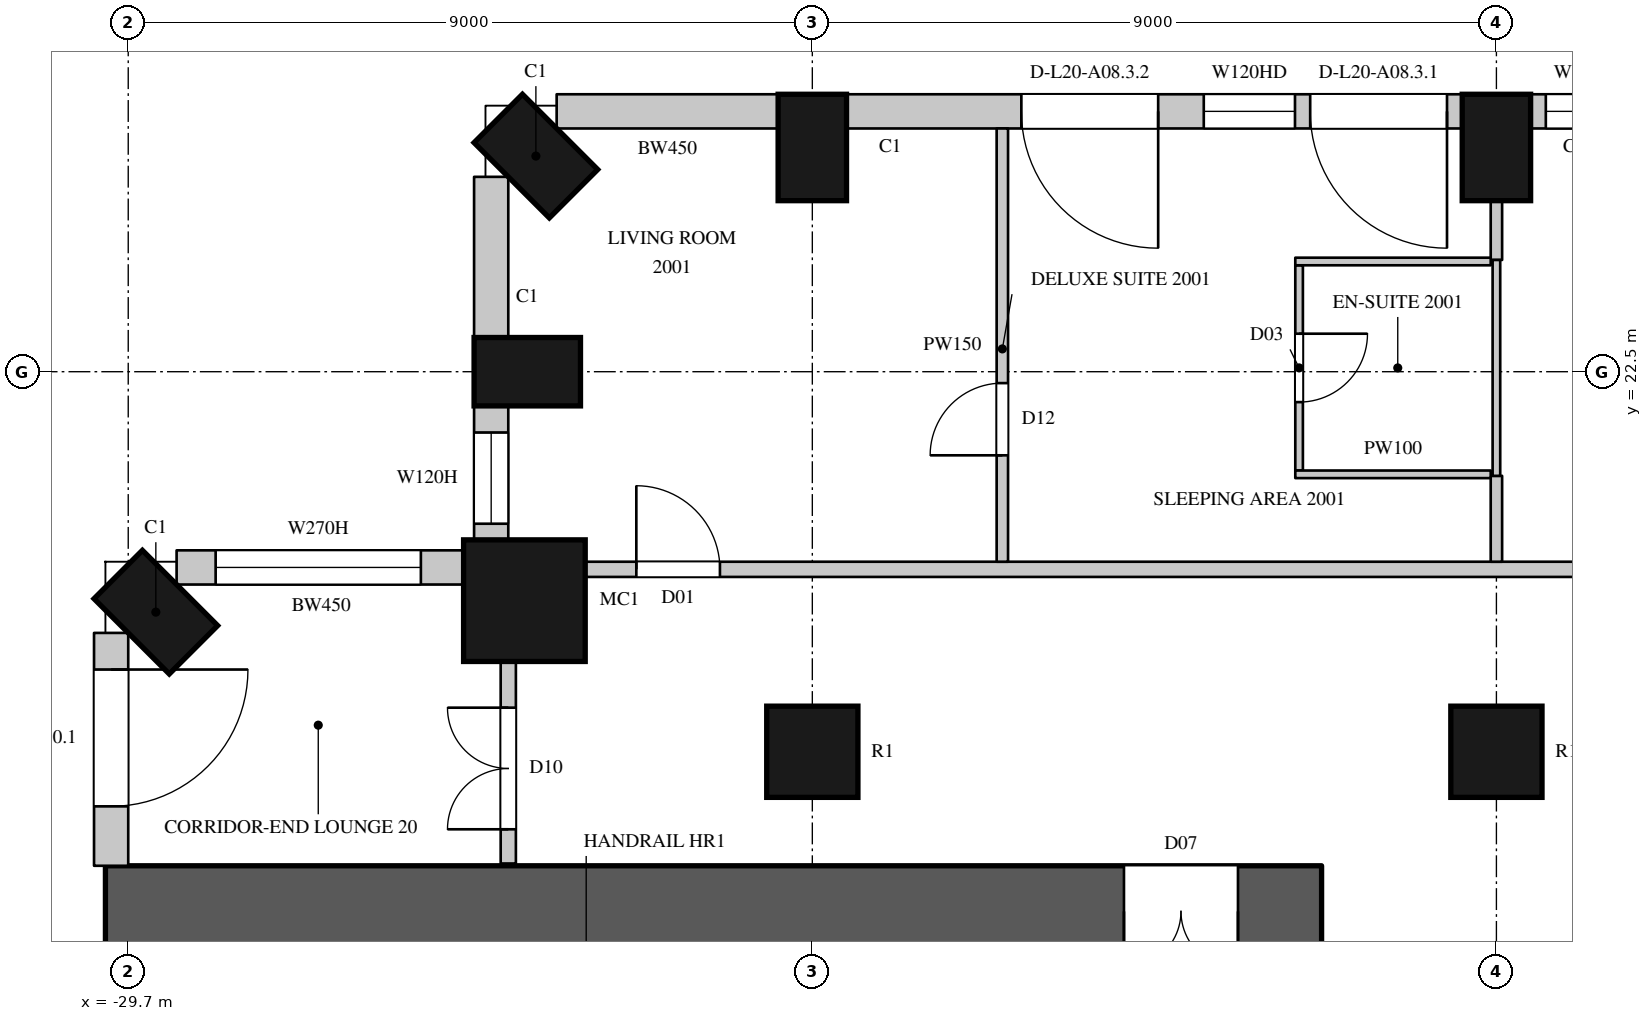
"""IFC4 building model, lengths in metres.
Left out: names, types, materials, properties, quantities, classifications, styles, units other than length and angle.
Written with IfcOpenShell. Run it as: python <this file> out.ifc"""

import sys

from ifc_helpers import new_model, si_unit, direction, frame, frame_2d, origin, origin_2d, place, context, subcontext, project, spatial, rectangle, circle, extrude, element, fill, save


model = new_model("IFC4")
c1 = context("Model", 3, precision=1e-05, world=origin(), true_north=direction((0.0, 1.0)))
c2 = subcontext(c1, "Body", "Model", "MODEL_VIEW")
j1 = project(units=[si_unit("LENGTHUNIT", "METRE"), si_unit("PLANEANGLEUNIT", "RADIAN")], contexts=[c1])
p1 = place(None, origin())
s1 = spatial("IfcSite", under=j1, at=p1, CompositionType="ELEMENT")
p2 = place(p1, origin())
s2 = spatial("IfcBuilding", under=s1, at=p2, CompositionType="ELEMENT")
p3 = place(p2, frame((0.0, 0.0, 102.3)))
s3 = spatial("IfcBuildingStorey", under=s2, at=p3, CompositionType="ELEMENT", Elevation=102.3)
for number, where, z_axis, x_axis in (
    (1, (-29.337, 19.337, 0.0), (0.0, 0.0, 1.0), (-0.707, -0.707, 0.0)),
    (2, (-11.7, 25.45, 0.0), (0.0, 0.0, 1.0), (-1.0, 0.0, 0.0)),
    (3, (-20.7, 25.45, 0.0), (0.0, 0.0, 1.0), (-1.0, 0.0, 0.0)),
    (4, (-24.337, 25.337, 0.0), (0.0, 0.0, 1.0), (-0.707, -0.707, 0.0)),
    (5, (-24.45, 22.5, 0.0), (0.0, 0.0, 1.0), (0.0, -1.0, 0.0)),
):
    element("IfcColumn", number, at=place(p3, frame(where, z_axis=z_axis, x_axis=x_axis)), inside=s3, PredefinedType="COLUMN", context=c2, shape_type="SweptSolid", body=[
        extrude(rectangle(XDim=0.9, YDim=1.4, at=origin_2d()), origin(), (0.0, 0.0, 1.0), 3.6),
    ])
p4 = place(p3, frame((-24.488, 19.488, 0.0), z_axis=(0.0, 0.0, 1.0), x_axis=(1.0, 0.0, 0.0)))
e6 = element("IfcColumn", 6, at=p4, inside=s3, PredefinedType="COLUMN", context=c2, shape_type="SweptSolid", body=[
    extrude(circle(Radius=0.8, at=origin_2d()), origin(), (0.0, 0.0, 1.0), 3.6),
])
for number, where, z_axis, x_axis in (
    (7, (-20.7, 17.5, 0.0), (0.0, 0.0, 1.0), (1.0, 0.0, 0.0)),
    (8, (-11.7, 17.5, 0.0), (0.0, 0.0, 1.0), (1.0, 0.0, 0.0)),
):
    element("IfcColumn", number, at=place(p3, frame(where, z_axis=z_axis, x_axis=x_axis)), inside=s3, PredefinedType="COLUMN", context=c2, shape_type="SweptSolid", body=[
        extrude(circle(Radius=0.6, at=origin_2d()), origin(), (0.0, 0.0, 1.0), 3.6),
    ])
p5 = place(p3, frame((-29.925, 19.064, 0.0), z_axis=(0.0, 0.0, 1.0), x_axis=(0.0, -1.0, 0.0)))
e9 = element("IfcWall", 9, at=p5, inside=s3, PredefinedType="SOLIDWALL", context=c2, shape_type="SweptSolid", body=[
    extrude(rectangle(XDim=3.064, YDim=0.45, at=frame_2d((1.532, 0.0))), origin(), (0.0, 0.0, 1.0), 3.3),
])
p6 = place(p5, frame((0.482, 0.0, 0.0)))
e10 = element("IfcOpeningElement", 10, at=p6, cuts=e9, PredefinedType="OPENING", context=c2, shape_type="SweptSolid", body=[
    extrude(rectangle(XDim=1.8, YDim=2.4, at=frame_2d((0.9, 1.2))), frame((0.0, 0.235, 0.0), z_axis=(0.0, -1.0, 0.0), x_axis=(1.0, 0.0, 0.0)), (0.0, 0.0, 1.0), 0.47),
])
p7 = place(p3, frame((-3.15, 25.925, 0.0), z_axis=(0.0, 0.0, 1.0), x_axis=(-1.0, 0.0, 0.0)))
e11 = element("IfcWall", 11, at=p7, inside=s3, PredefinedType="SOLIDWALL", context=c2, shape_type="SweptSolid", body=[
    extrude(rectangle(XDim=8.1, YDim=0.45, at=frame_2d((4.05, 0.0))), origin(), (0.0, 0.0, 1.0), 3.3),
])
p8 = place(p7, frame((0.2, 0.0, 0.0)))
e12 = element("IfcOpeningElement", 12, at=p8, cuts=e11, PredefinedType="OPENING", context=c2, shape_type="SweptSolid", body=[
    extrude(rectangle(XDim=1.8, YDim=2.4, at=frame_2d((0.9, 1.2))), frame((0.0, 0.235, 0.0), z_axis=(0.0, -1.0, 0.0), x_axis=(1.0, 0.0, 0.0)), (0.0, 0.0, 1.0), 0.47),
])
p9 = place(p7, frame((2.2, 0.0, 1.05)))
e13 = element("IfcOpeningElement", 13, at=p9, cuts=e11, PredefinedType="OPENING", context=c2, shape_type="SweptSolid", body=[
    extrude(rectangle(XDim=1.2, YDim=2.0, at=frame_2d((0.6, 1.0))), frame((0.0, 0.235, 0.0), z_axis=(0.0, -1.0, 0.0), x_axis=(1.0, 0.0, 0.0)), (0.0, 0.0, 1.0), 0.47),
])
p10 = place(p7, frame((4.7, 0.0, 0.0)))
e14 = element("IfcOpeningElement", 14, at=p10, cuts=e11, PredefinedType="OPENING", context=c2, shape_type="SweptSolid", body=[
    extrude(rectangle(XDim=1.8, YDim=2.4, at=frame_2d((0.9, 1.2))), frame((0.0, 0.235, 0.0), z_axis=(0.0, -1.0, 0.0), x_axis=(1.0, 0.0, 0.0)), (0.0, 0.0, 1.0), 0.47),
])
p11 = place(p7, frame((6.7, 0.0, 1.05)))
e15 = element("IfcOpeningElement", 15, at=p11, cuts=e11, PredefinedType="OPENING", context=c2, shape_type="SweptSolid", body=[
    extrude(rectangle(XDim=1.2, YDim=2.0, at=frame_2d((0.6, 1.0))), frame((0.0, 0.235, 0.0), z_axis=(0.0, -1.0, 0.0), x_axis=(1.0, 0.0, 0.0)), (0.0, 0.0, 1.0), 0.47),
])
p12 = place(p3, frame((-12.15, 25.925, 0.0), z_axis=(0.0, 0.0, 1.0), x_axis=(-1.0, 0.0, 0.0)))
e16 = element("IfcWall", 16, at=p12, inside=s3, PredefinedType="SOLIDWALL", context=c2, shape_type="SweptSolid", body=[
    extrude(rectangle(XDim=8.1, YDim=0.45, at=frame_2d((4.05, 0.0))), origin(), (0.0, 0.0, 1.0), 3.3),
])
p13 = place(p12, frame((0.2, 0.0, 0.0)))
e17 = element("IfcOpeningElement", 17, at=p13, cuts=e16, PredefinedType="OPENING", context=c2, shape_type="SweptSolid", body=[
    extrude(rectangle(XDim=1.8, YDim=2.4, at=frame_2d((0.9, 1.2))), frame((0.0, 0.235, 0.0), z_axis=(0.0, -1.0, 0.0), x_axis=(1.0, 0.0, 0.0)), (0.0, 0.0, 1.0), 0.47),
])
p14 = place(p12, frame((2.2, 0.0, 1.05)))
e18 = element("IfcOpeningElement", 18, at=p14, cuts=e16, PredefinedType="OPENING", context=c2, shape_type="SweptSolid", body=[
    extrude(rectangle(XDim=1.2, YDim=2.0, at=frame_2d((0.6, 1.0))), frame((0.0, 0.235, 0.0), z_axis=(0.0, -1.0, 0.0), x_axis=(1.0, 0.0, 0.0)), (0.0, 0.0, 1.0), 0.47),
])
p15 = place(p12, frame((4.0, 0.0, 0.0)))
e19 = element("IfcOpeningElement", 19, at=p15, cuts=e16, PredefinedType="OPENING", context=c2, shape_type="SweptSolid", body=[
    extrude(rectangle(XDim=1.8, YDim=2.4, at=frame_2d((0.9, 1.2))), frame((0.0, 0.235, 0.0), z_axis=(0.0, -1.0, 0.0), x_axis=(1.0, 0.0, 0.0)), (0.0, 0.0, 1.0), 0.47),
])
p16 = place(p3, frame((-21.15, 25.925, 0.0), z_axis=(0.0, 0.0, 1.0), x_axis=(-1.0, 0.0, 0.0)))
e20 = element("IfcWall", 20, at=p16, inside=s3, PredefinedType="SOLIDWALL", context=c2, shape_type="SweptSolid", body=[
    extrude(rectangle(XDim=2.914, YDim=0.45, at=frame_2d((1.457, 0.0))), origin(), (0.0, 0.0, 1.0), 3.3),
])
p17 = place(p3, frame((-24.925, 25.064, 0.0), z_axis=(0.0, 0.0, 1.0), x_axis=(0.0, -1.0, 0.0)))
e21 = element("IfcWall", 21, at=p17, inside=s3, PredefinedType="SOLIDWALL", context=c2, shape_type="SweptSolid", body=[
    extrude(rectangle(XDim=2.114, YDim=0.45, at=frame_2d((1.057, 0.0))), origin(), (0.0, 0.0, 1.0), 3.3),
])
p18 = place(p3, frame((-24.925, 22.05, 0.0), z_axis=(0.0, 0.0, 1.0), x_axis=(0.0, -1.0, 0.0)))
e22 = element("IfcWall", 22, at=p18, inside=s3, PredefinedType="SOLIDWALL", context=c2, shape_type="SweptSolid", body=[
    extrude(rectangle(XDim=1.792, YDim=0.45, at=frame_2d((0.896, 0.0))), origin(), (0.0, 0.0, 1.0), 3.3),
])
p19 = place(p18, frame((0.35, 0.0, 1.05)))
e23 = element("IfcOpeningElement", 23, at=p19, cuts=e22, PredefinedType="OPENING", context=c2, shape_type="SweptSolid", body=[
    extrude(rectangle(XDim=1.2, YDim=2.0, at=frame_2d((0.6, 1.0))), frame((0.0, 0.235, 0.0), z_axis=(0.0, -1.0, 0.0), x_axis=(1.0, 0.0, 0.0)), (0.0, 0.0, 1.0), 0.47),
])
p20 = place(p3, frame((-25.259, 19.925, 0.0), z_axis=(0.0, 0.0, 1.0), x_axis=(-1.0, 0.0, 0.0)))
e24 = element("IfcWall", 24, at=p20, inside=s3, PredefinedType="SOLIDWALL", context=c2, shape_type="SweptSolid", body=[
    extrude(rectangle(XDim=3.805, YDim=0.45, at=frame_2d((1.903, 0.0))), origin(), (0.0, 0.0, 1.0), 3.3),
])
p21 = place(p20, frame((0.592, 0.0, 1.05)))
e25 = element("IfcOpeningElement", 25, at=p21, cuts=e24, PredefinedType="OPENING", context=c2, shape_type="SweptSolid", body=[
    extrude(rectangle(XDim=2.7, YDim=2.0, at=frame_2d((1.35, 1.0))), frame((0.0, 0.235, 0.0), z_axis=(0.0, -1.0, 0.0), x_axis=(1.0, 0.0, 0.0)), (0.0, 0.0, 1.0), 0.47),
])
p22 = place(p3, frame((-30.0, 15.4, 0.0), z_axis=(0.0, 0.0, 1.0), x_axis=(1.0, 0.0, 0.0)))
e26 = element("IfcWall", 26, at=p22, inside=s3, PredefinedType="SHEAR", context=c2, shape_type="SweptSolid", body=[
    extrude(rectangle(XDim=16.0, YDim=1.2, at=frame_2d((8.0, 0.0))), origin(), (0.0, 0.0, 1.0), 3.6),
])
p23 = place(p22, frame((13.4, 0.0, 0.0)))
e27 = element("IfcOpeningElement", 27, at=p23, cuts=e26, PredefinedType="OPENING", context=c2, shape_type="SweptSolid", body=[
    extrude(rectangle(XDim=1.5, YDim=2.4, at=frame_2d((0.75, 1.2))), frame((0.0, 0.61, 0.0), z_axis=(0.0, -1.0, 0.0), x_axis=(1.0, 0.0, 0.0)), (0.0, 0.0, 1.0), 1.22),
])
p24 = place(p3, frame((-24.7, 16.03, 0.0), z_axis=(0.0, 0.0, 1.0), x_axis=(0.0, 1.0, 0.0)))
e28 = element("IfcWall", 28, at=p24, inside=s3, PredefinedType="PARTITIONING", context=c2, shape_type="SweptSolid", body=[
    extrude(rectangle(XDim=2.67, YDim=0.2, at=frame_2d((1.335, 0.0))), origin(), (0.0, 0.0, 1.0), 3.3),
])
p25 = place(p24, frame((0.45, 0.0, 0.0)))
e29 = element("IfcOpeningElement", 29, at=p25, cuts=e28, PredefinedType="OPENING", context=c2, shape_type="SweptSolid", body=[
    extrude(rectangle(XDim=1.6, YDim=2.4, at=frame_2d((0.8, 1.2))), frame((0.0, 0.11, 0.0), z_axis=(0.0, -1.0, 0.0), x_axis=(1.0, 0.0, 0.0)), (0.0, 0.0, 1.0), 0.22),
])
p26 = place(p3, frame((-23.765, 19.9, 0.0), z_axis=(0.0, 0.0, 1.0), x_axis=(1.0, 0.0, 0.0)))
e30 = element("IfcWall", 30, at=p26, inside=s3, PredefinedType="PARTITIONING", context=c2, shape_type="SweptSolid", body=[
    extrude(rectangle(XDim=41.549, YDim=0.2, at=frame_2d((20.774, 0.0))), origin(), (0.0, 0.0, 1.0), 3.3),
])
p27 = place(p26, frame((14.2, 0.0, 0.0)))
e31 = element("IfcOpeningElement", 31, at=p27, cuts=e30, PredefinedType="OPENING", context=c2, shape_type="SweptSolid", body=[
    extrude(rectangle(XDim=0.9, YDim=2.2, at=frame_2d((0.45, 1.1))), frame((0.0, 0.11, 0.0), z_axis=(0.0, -1.0, 0.0), x_axis=(1.0, 0.0, 0.0)), (0.0, 0.0, 1.0), 0.22),
])
p28 = place(p26, frame((27.05, 0.0, 0.0)))
e32 = element("IfcOpeningElement", 32, at=p28, cuts=e30, PredefinedType="OPENING", context=c2, shape_type="SweptSolid", body=[
    extrude(rectangle(XDim=0.9, YDim=2.2, at=frame_2d((0.45, 1.1))), frame((0.0, 0.11, 0.0), z_axis=(0.0, -1.0, 0.0), x_axis=(1.0, 0.0, 0.0)), (0.0, 0.0, 1.0), 0.22),
])
p29 = place(p26, frame((0.75, 0.0, 0.0)))
e33 = element("IfcOpeningElement", 33, at=p29, cuts=e30, PredefinedType="OPENING", context=c2, shape_type="SweptSolid", body=[
    extrude(rectangle(XDim=1.1, YDim=2.4, at=frame_2d((0.55, 1.2))), frame((0.0, 0.11, 0.0), z_axis=(0.0, -1.0, 0.0), x_axis=(1.0, 0.0, 0.0)), (0.0, 0.0, 1.0), 0.22),
])
p30 = place(p26, frame((23.15, 0.0, 0.0)))
e34 = element("IfcOpeningElement", 34, at=p30, cuts=e30, PredefinedType="OPENING", context=c2, shape_type="SweptSolid", body=[
    extrude(rectangle(XDim=0.95, YDim=2.2, at=frame_2d((0.475, 1.1))), frame((0.0, 0.11, 0.0), z_axis=(0.0, -1.0, 0.0), x_axis=(1.0, 0.0, 0.0)), (0.0, 0.0, 1.0), 0.22),
])
p31 = place(p26, frame((34.95, 0.0, 0.0)))
e35 = element("IfcOpeningElement", 35, at=p31, cuts=e30, PredefinedType="OPENING", context=c2, shape_type="SweptSolid", body=[
    extrude(rectangle(XDim=0.95, YDim=2.2, at=frame_2d((0.475, 1.1))), frame((0.0, 0.11, 0.0), z_axis=(0.0, -1.0, 0.0), x_axis=(1.0, 0.0, 0.0)), (0.0, 0.0, 1.0), 0.22),
])
p32 = place(p3, frame((-18.2, 20.0, 0.0), z_axis=(0.0, 0.0, 1.0), x_axis=(0.0, 1.0, 0.0)))
e36 = element("IfcWall", 36, at=p32, inside=s3, PredefinedType="PARTITIONING", context=c2, shape_type="SweptSolid", body=[
    extrude(rectangle(XDim=5.7, YDim=0.15, at=frame_2d((2.85, 0.0))), origin(), (0.0, 0.0, 1.0), 3.3),
])
p33 = place(p32, frame((1.4, 0.0, 0.0)))
e37 = element("IfcOpeningElement", 37, at=p33, cuts=e36, PredefinedType="OPENING", context=c2, shape_type="SweptSolid", body=[
    extrude(rectangle(XDim=0.95, YDim=2.2, at=frame_2d((0.475, 1.1))), frame((0.0, 0.085, 0.0), z_axis=(0.0, -1.0, 0.0), x_axis=(1.0, 0.0, 0.0)), (0.0, 0.0, 1.0), 0.17),
])
p34 = place(p3, frame((-11.7, 20.0, 0.0), z_axis=(0.0, 0.0, 1.0), x_axis=(0.0, 1.0, 0.0)))
e38 = element("IfcWall", 38, at=p34, inside=s3, PredefinedType="PARTITIONING", context=c2, shape_type="SweptSolid", body=[
    extrude(rectangle(XDim=1.13, YDim=0.15, at=frame_2d((0.565, 0.0))), origin(), (0.0, 0.0, 1.0), 2.75),
])
p35 = place(p3, frame((-11.7, 23.97, 0.0), z_axis=(0.0, 0.0, 1.0), x_axis=(0.0, 1.0, 0.0)))
e39 = element("IfcWall", 39, at=p35, inside=s3, PredefinedType="PARTITIONING", context=c2, shape_type="SweptSolid", body=[
    extrude(rectangle(XDim=0.78, YDim=0.15, at=frame_2d((0.39, 0.0))), origin(), (0.0, 0.0, 1.0), 2.75),
])
p36 = place(p3, frame((-14.296, 21.2, 0.0), z_axis=(0.0, 0.0, 1.0), x_axis=(0.0, 1.0, 0.0)))
e40 = element("IfcWall", 40, at=p36, inside=s3, PredefinedType="PARTITIONING", context=c2, shape_type="SweptSolid", body=[
    extrude(rectangle(XDim=2.7, YDim=0.1, at=frame_2d((1.35, 0.0))), origin(), (0.0, 0.0, 1.0), 3.3),
])
p37 = place(p36, frame((0.9, 0.0, 0.0)))
e41 = element("IfcOpeningElement", 41, at=p37, cuts=e40, PredefinedType="OPENING", context=c2, shape_type="SweptSolid", body=[
    extrude(rectangle(XDim=0.9, YDim=2.2, at=frame_2d((0.45, 1.1))), frame((0.0, 0.06, 0.0), z_axis=(0.0, -1.0, 0.0), x_axis=(1.0, 0.0, 0.0)), (0.0, 0.0, 1.0), 0.12),
])
for number, where, z_axis, x_axis in (
    (42, (-14.346, 21.15, 0.0), (0.0, 0.0, 1.0), (1.0, 0.0, 0.0)),
    (43, (-14.346, 23.95, 0.0), (0.0, 0.0, 1.0), (1.0, 0.0, 0.0)),
):
    element("IfcWall", number, at=place(p3, frame(where, z_axis=z_axis, x_axis=x_axis)), inside=s3, PredefinedType="PARTITIONING", context=c2, shape_type="SweptSolid", body=[
        extrude(rectangle(XDim=2.571, YDim=0.1, at=frame_2d((1.286, 0.0))), origin(), (0.0, 0.0, 1.0), 3.3),
    ])
p38 = place(p3, frame((-11.7, 21.13, 0.0), z_axis=(0.0, 0.0, 1.0), x_axis=(0.0, 1.0, 0.0)))
e44 = element("IfcWall", 44, at=p38, inside=s3, PredefinedType="PARTITIONING", context=c2, shape_type="SweptSolid", body=[
    extrude(rectangle(XDim=2.84, YDim=0.1, at=frame_2d((1.42, 0.0))), origin(), (0.0, 0.0, 1.0), 2.75),
])
p39 = place(p6, origin())
e45 = element("IfcDoor", 45, at=p39, inside=s3, OperationType="SLIDING_TO_LEFT", PredefinedType="DOOR", context=c2, shape_type="SweptSolid", body=[
    extrude(rectangle(XDim=1.8, YDim=2.4, at=frame_2d((0.9, 1.2))), frame((0.0, 0.13, 0.0), z_axis=(0.0, -1.0, 0.0), x_axis=(1.0, 0.0, 0.0)), (0.0, 0.0, 1.0), 0.05),
])
fill(e10, e45)
p40 = place(p11, origin())
e46 = element("IfcWindow", 46, at=p40, inside=s3, PartitioningType="SINGLE_PANEL", PredefinedType="WINDOW", context=c2, shape_type="SweptSolid", body=[
    extrude(rectangle(XDim=1.2, YDim=2.0, at=frame_2d((0.6, 1.0))), frame((0.0, 0.135, 0.0), z_axis=(0.0, -1.0, 0.0), x_axis=(1.0, 0.0, 0.0)), (0.0, 0.0, 1.0), 0.06),
])
fill(e15, e46)
p41 = place(p13, origin())
e47 = element("IfcDoor", 47, at=p41, inside=s3, OperationType="SLIDING_TO_LEFT", PredefinedType="DOOR", context=c2, shape_type="SweptSolid", body=[
    extrude(rectangle(XDim=1.8, YDim=2.4, at=frame_2d((0.9, 1.2))), frame((0.0, 0.13, 0.0), z_axis=(0.0, -1.0, 0.0), x_axis=(1.0, 0.0, 0.0)), (0.0, 0.0, 1.0), 0.05),
])
fill(e17, e47)
p42 = place(p14, origin())
e48 = element("IfcWindow", 48, at=p42, inside=s3, PartitioningType="SINGLE_PANEL", PredefinedType="WINDOW", context=c2, shape_type="SweptSolid", body=[
    extrude(rectangle(XDim=1.2, YDim=2.0, at=frame_2d((0.6, 1.0))), frame((0.0, 0.135, 0.0), z_axis=(0.0, -1.0, 0.0), x_axis=(1.0, 0.0, 0.0)), (0.0, 0.0, 1.0), 0.06),
])
fill(e18, e48)
p43 = place(p15, origin())
e49 = element("IfcDoor", 49, at=p43, inside=s3, OperationType="SLIDING_TO_LEFT", PredefinedType="DOOR", context=c2, shape_type="SweptSolid", body=[
    extrude(rectangle(XDim=1.8, YDim=2.4, at=frame_2d((0.9, 1.2))), frame((0.0, 0.13, 0.0), z_axis=(0.0, -1.0, 0.0), x_axis=(1.0, 0.0, 0.0)), (0.0, 0.0, 1.0), 0.05),
])
fill(e19, e49)
p44 = place(p19, origin())
e50 = element("IfcWindow", 50, at=p44, inside=s3, PartitioningType="SINGLE_PANEL", PredefinedType="WINDOW", context=c2, shape_type="SweptSolid", body=[
    extrude(rectangle(XDim=1.2, YDim=2.0, at=frame_2d((0.6, 1.0))), frame((0.0, 0.135, 0.0), z_axis=(0.0, -1.0, 0.0), x_axis=(1.0, 0.0, 0.0)), (0.0, 0.0, 1.0), 0.06),
])
fill(e23, e50)
p45 = place(p21, origin())
e51 = element("IfcWindow", 51, at=p45, inside=s3, PartitioningType="SINGLE_PANEL", PredefinedType="WINDOW", context=c2, shape_type="SweptSolid", body=[
    extrude(rectangle(XDim=2.7, YDim=2.0, at=frame_2d((1.35, 1.0))), frame((0.0, 0.135, 0.0), z_axis=(0.0, -1.0, 0.0), x_axis=(1.0, 0.0, 0.0)), (0.0, 0.0, 1.0), 0.06),
])
fill(e25, e51)
p46 = place(p25, origin())
e52 = element("IfcDoor", 52, at=p46, inside=s3, OperationType="DOUBLE_DOOR_SINGLE_SWING", PredefinedType="DOOR", context=c2, shape_type="SweptSolid", body=[
    extrude(rectangle(XDim=1.6, YDim=2.4, at=frame_2d((0.8, 1.2))), frame((0.0, 0.025, 0.0), z_axis=(0.0, -1.0, 0.0), x_axis=(1.0, 0.0, 0.0)), (0.0, 0.0, 1.0), 0.05),
])
fill(e29, e52)
p47 = place(p29, origin())
e53 = element("IfcDoor", 53, at=p47, inside=s3, OperationType="SINGLE_SWING_LEFT", PredefinedType="DOOR", context=c2, shape_type="SweptSolid", body=[
    extrude(rectangle(XDim=1.1, YDim=2.4, at=frame_2d((0.55, 1.2))), frame((0.0, 0.025, 0.0), z_axis=(0.0, -1.0, 0.0), x_axis=(1.0, 0.0, 0.0)), (0.0, 0.0, 1.0), 0.05),
])
fill(e33, e53)
p48 = place(p33, origin())
e54 = element("IfcDoor", 54, at=p48, inside=s3, OperationType="SINGLE_SWING_LEFT", PredefinedType="DOOR", context=c2, shape_type="SweptSolid", body=[
    extrude(rectangle(XDim=0.95, YDim=2.2, at=frame_2d((0.475, 1.1))), frame((0.0, 0.025, 0.0), z_axis=(0.0, -1.0, 0.0), x_axis=(1.0, 0.0, 0.0)), (0.0, 0.0, 1.0), 0.05),
])
fill(e37, e54)
p49 = place(p37, origin())
e55 = element("IfcDoor", 55, at=p49, inside=s3, OperationType="SINGLE_SWING_LEFT", PredefinedType="DOOR", context=c2, shape_type="SweptSolid", body=[
    extrude(rectangle(XDim=0.9, YDim=2.2, at=frame_2d((0.45, 1.1))), frame((0.0, 0.025, 0.0), z_axis=(0.0, -1.0, 0.0), x_axis=(1.0, 0.0, 0.0)), (0.0, 0.0, 1.0), 0.05),
])
fill(e41, e55)
p50 = place(p23, origin())
e56 = element("IfcDoor", 56, at=p50, inside=s3, OperationType="DOUBLE_DOOR_SINGLE_SWING", PredefinedType="DOOR", context=c2, shape_type="SweptSolid", body=[
    extrude(rectangle(XDim=1.5, YDim=2.4, at=frame_2d((0.75, 1.2))), frame((0.0, 0.025, 0.0), z_axis=(0.0, -1.0, 0.0), x_axis=(1.0, 0.0, 0.0)), (0.0, 0.0, 1.0), 0.05),
])
fill(e27, e56)
save(model, sys.argv[1])
